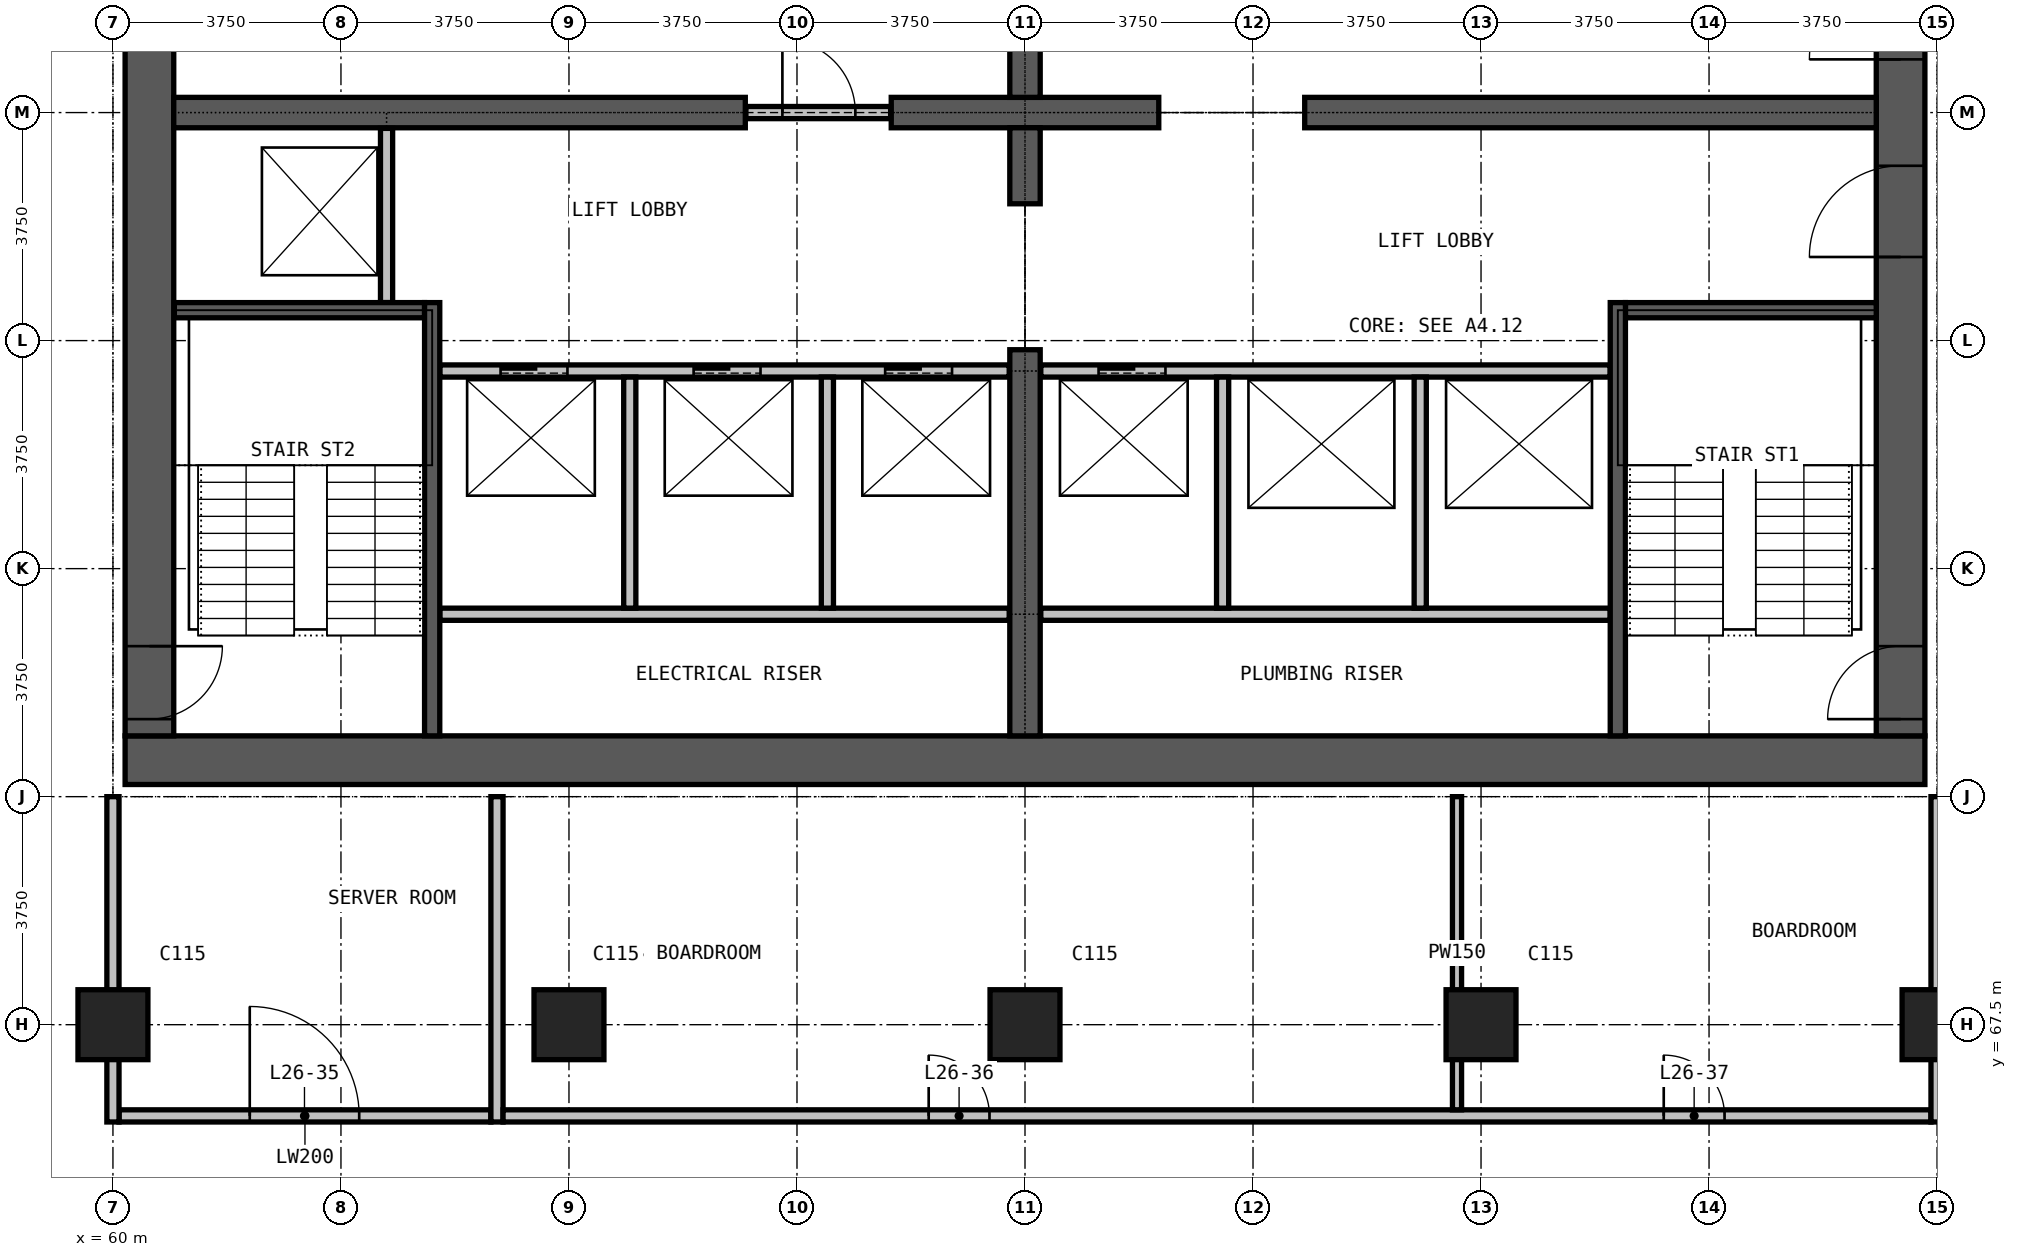
"""IFC4 building model, lengths in metres.
Left out: names, types, materials, properties, quantities, classifications, styles, units other than length and angle.
Written with IfcOpenShell. Run it as: python <this file> out.ifc"""

import sys

from ifc_helpers import new_model, si_unit, direction, frame, frame_2d, origin, origin_2d, place, context, subcontext, project, spatial, rectangle, extrude, element, fill, save


model = new_model("IFC4")
c1 = context("Model", 3, precision=1e-05, world=origin(), true_north=direction((0.0, 1.0)))
c2 = subcontext(c1, "Body", "Model", "MODEL_VIEW")
j1 = project(units=[si_unit("LENGTHUNIT", "METRE"), si_unit("PLANEANGLEUNIT", "RADIAN")], contexts=[c1])
p1 = place(None, origin())
s1 = spatial("IfcSite", under=j1, at=p1, CompositionType="ELEMENT")
p2 = place(p1, origin())
s2 = spatial("IfcBuilding", under=s1, at=p2, CompositionType="ELEMENT")
p3 = place(p2, frame((0.0, 0.0, 107.2)))
s3 = spatial("IfcBuildingStorey", under=s2, at=p3, CompositionType="ELEMENT", Elevation=107.2)
for number, where, z_axis, x_axis in (
    (1, (60.0, 67.5, 0.0), (0.0, 0.0, 1.0), (1.0, 0.0, 0.0)),
    (2, (67.5, 67.5, 0.0), (0.0, 0.0, 1.0), (1.0, 0.0, 0.0)),
    (3, (75.0, 67.5, 0.0), (0.0, 0.0, 1.0), (1.0, 0.0, 0.0)),
    (4, (82.5, 67.5, 0.0), (0.0, 0.0, 1.0), (1.0, 0.0, 0.0)),
    (5, (90.0, 67.5, 0.0), (0.0, 0.0, 1.0), (1.0, 0.0, 0.0)),
):
    element("IfcColumn", number, at=place(p3, frame(where, z_axis=z_axis, x_axis=x_axis)), inside=s3, PredefinedType="COLUMN", context=c2, shape_type="SweptSolid", body=[
        extrude(rectangle(XDim=1.15, YDim=1.15, at=origin_2d()), origin(), (0.0, 0.0, 1.0), 3.6),
    ])
p4 = place(p3, frame((60.2, 71.85, 0.0), z_axis=(0.0, 0.0, 1.0), x_axis=(1.0, 0.0, 0.0)))
e6 = element("IfcWall", 6, at=p4, inside=s3, PredefinedType="SHEAR", context=c2, shape_type="SweptSolid", body=[
    extrude(rectangle(XDim=29.6, YDim=0.8, at=frame_2d((14.8, 0.0))), origin(), (0.0, 0.0, 1.0), 3.6),
])
p5 = place(p3, frame((89.4, 72.25, 0.0), z_axis=(0.0, 0.0, 1.0), x_axis=(0.0, 1.0, 0.0)))
e7 = element("IfcWall", 7, at=p5, inside=s3, PredefinedType="SHEAR", context=c2, shape_type="SweptSolid", body=[
    extrude(rectangle(XDim=20.5, YDim=0.8, at=frame_2d((10.25, 0.0))), origin(), (0.0, 0.0, 1.0), 3.6),
])
p6 = place(p5, frame((0.275, 0.0, 0.0)))
e8 = element("IfcOpeningElement", 8, at=p6, cuts=e7, PredefinedType="OPENING", context=c2, shape_type="SweptSolid", body=[
    extrude(rectangle(XDim=1.2, YDim=2.2, at=frame_2d((0.6, 1.1))), frame((0.0, 0.41, 0.0), z_axis=(0.0, -1.0, 0.0), x_axis=(1.0, 0.0, 0.0)), (0.0, 0.0, 1.0), 0.82),
])
p7 = place(p5, frame((13.775, 0.0, 0.0)))
e9 = element("IfcOpeningElement", 9, at=p7, cuts=e7, PredefinedType="OPENING", context=c2, shape_type="SweptSolid", body=[
    extrude(rectangle(XDim=1.2, YDim=2.2, at=frame_2d((0.6, 1.1))), frame((0.0, 0.41, 0.0), z_axis=(0.0, -1.0, 0.0), x_axis=(1.0, 0.0, 0.0)), (0.0, 0.0, 1.0), 0.82),
])
p8 = place(p5, frame((7.875, 0.0, 0.0)))
e10 = element("IfcOpeningElement", 10, at=p8, cuts=e7, PredefinedType="OPENING", context=c2, shape_type="SweptSolid", body=[
    extrude(rectangle(XDim=1.5, YDim=2.2, at=frame_2d((0.75, 1.1))), frame((0.0, 0.41, 0.0), z_axis=(0.0, -1.0, 0.0), x_axis=(1.0, 0.0, 0.0)), (0.0, 0.0, 1.0), 0.82),
])
p9 = place(p5, frame((11.125, 0.0, 0.0)))
e11 = element("IfcOpeningElement", 11, at=p9, cuts=e7, PredefinedType="OPENING", context=c2, shape_type="SweptSolid", body=[
    extrude(rectangle(XDim=1.5, YDim=2.2, at=frame_2d((0.75, 1.1))), frame((0.0, 0.41, 0.0), z_axis=(0.0, -1.0, 0.0), x_axis=(1.0, 0.0, 0.0)), (0.0, 0.0, 1.0), 0.82),
])
p10 = place(p3, frame((60.6, 92.75, 0.0), z_axis=(0.0, 0.0, 1.0), x_axis=(0.0, -1.0, 0.0)))
e12 = element("IfcWall", 12, at=p10, inside=s3, PredefinedType="SHEAR", context=c2, shape_type="SweptSolid", body=[
    extrude(rectangle(XDim=20.5, YDim=0.8, at=frame_2d((10.25, 0.0))), origin(), (0.0, 0.0, 1.0), 3.6),
])
p11 = place(p10, frame((19.025, 0.0, 0.0)))
e13 = element("IfcOpeningElement", 13, at=p11, cuts=e12, PredefinedType="OPENING", context=c2, shape_type="SweptSolid", body=[
    extrude(rectangle(XDim=1.2, YDim=2.2, at=frame_2d((0.6, 1.1))), frame((0.0, 0.41, 0.0), z_axis=(0.0, -1.0, 0.0), x_axis=(1.0, 0.0, 0.0)), (0.0, 0.0, 1.0), 0.82),
])
p12 = place(p10, frame((8.025, 0.0, 0.0)))
e14 = element("IfcOpeningElement", 14, at=p12, cuts=e12, PredefinedType="OPENING", context=c2, shape_type="SweptSolid", body=[
    extrude(rectangle(XDim=1.2, YDim=2.2, at=frame_2d((0.6, 1.1))), frame((0.0, 0.41, 0.0), z_axis=(0.0, -1.0, 0.0), x_axis=(1.0, 0.0, 0.0)), (0.0, 0.0, 1.0), 0.82),
])
p13 = place(p3, frame((61.0, 82.5, 0.0), z_axis=(0.0, 0.0, 1.0), x_axis=(1.0, 0.0, 0.0)))
e15 = element("IfcWall", 15, at=p13, inside=s3, PredefinedType="SHEAR", context=c2, shape_type="SweptSolid", body=[
    extrude(rectangle(XDim=9.4, YDim=0.5, at=frame_2d((4.7, 0.0))), origin(), (0.0, 0.0, 1.0), 3.6),
])
p14 = place(p3, frame((72.8, 82.5, 0.0), z_axis=(0.0, 0.0, 1.0), x_axis=(1.0, 0.0, 0.0)))
e16 = element("IfcWall", 16, at=p14, inside=s3, PredefinedType="SHEAR", context=c2, shape_type="SweptSolid", body=[
    extrude(rectangle(XDim=4.4, YDim=0.5, at=frame_2d((2.2, 0.0))), origin(), (0.0, 0.0, 1.0), 3.6),
])
p15 = place(p3, frame((79.6, 82.5, 0.0), z_axis=(0.0, 0.0, 1.0), x_axis=(1.0, 0.0, 0.0)))
e17 = element("IfcWall", 17, at=p15, inside=s3, PredefinedType="SHEAR", context=c2, shape_type="SweptSolid", body=[
    extrude(rectangle(XDim=9.4, YDim=0.5, at=frame_2d((4.7, 0.0))), origin(), (0.0, 0.0, 1.0), 3.6),
])
p16 = place(p3, frame((75.0, 72.25, 0.0), z_axis=(0.0, 0.0, 1.0), x_axis=(0.0, 1.0, 0.0)))
e18 = element("IfcWall", 18, at=p16, inside=s3, PredefinedType="SHEAR", context=c2, shape_type="SweptSolid", body=[
    extrude(rectangle(XDim=6.35, YDim=0.5, at=frame_2d((3.175, 0.0))), origin(), (0.0, 0.0, 1.0), 3.6),
])
for number, where, z_axis, x_axis in (
    (19, (75.0, 81.0, 0.0), (0.0, 0.0, 1.0), (0.0, 1.0, 0.0)),
    (20, (75.0, 82.75, 0.0), (0.0, 0.0, 1.0), (0.0, 1.0, 0.0)),
):
    element("IfcWall", number, at=place(p3, frame(where, z_axis=z_axis, x_axis=x_axis)), inside=s3, PredefinedType="SHEAR", context=c2, shape_type="SweptSolid", body=[
        extrude(rectangle(XDim=1.25, YDim=0.5, at=frame_2d((0.625, 0.0))), origin(), (0.0, 0.0, 1.0), 3.6),
    ])
p17 = place(p3, frame((60.1, 66.0, 0.0), z_axis=(0.0, 0.0, 1.0), x_axis=(1.0, 0.0, 0.0)))
e21 = element("IfcWall", 21, at=p17, inside=s3, PredefinedType="PARTITIONING", context=c2, shape_type="SweptSolid", body=[
    extrude(rectangle(XDim=6.116, YDim=0.2, at=frame_2d((3.058, 0.0))), origin(), (0.0, 0.0, 1.0), 3.3),
])
p18 = place(p17, frame((2.15, 0.0, 0.0)))
e22 = element("IfcOpeningElement", 22, at=p18, cuts=e21, PredefinedType="OPENING", context=c2, shape_type="SweptSolid", body=[
    extrude(rectangle(XDim=1.8, YDim=2.4, at=frame_2d((0.9, 1.2))), frame((0.0, 0.11, 0.0), z_axis=(0.0, -1.0, 0.0), x_axis=(1.0, 0.0, 0.0)), (0.0, 0.0, 1.0), 0.22),
])
p19 = place(p3, frame((70.41, 82.5, 0.0), z_axis=(0.0, 0.0, 1.0), x_axis=(1.0, 0.0, 0.0)))
e23 = element("IfcWall", 23, at=p19, inside=s3, PredefinedType="PARTITIONING", context=c2, shape_type="SweptSolid", body=[
    extrude(rectangle(XDim=2.38, YDim=0.2, at=frame_2d((1.19, 0.0))), origin(), (0.0, 0.0, 1.0), 2.4),
])
p20 = place(p19, frame((0.6, 0.0, 0.0)))
e24 = element("IfcOpeningElement", 24, at=p20, cuts=e23, PredefinedType="OPENING", context=c2, shape_type="SweptSolid", body=[
    extrude(rectangle(XDim=1.2, YDim=2.2, at=frame_2d((0.6, 1.1))), frame((0.0, 0.11, 0.0), z_axis=(0.0, -1.0, 0.0), x_axis=(1.0, 0.0, 0.0)), (0.0, 0.0, 1.0), 0.22),
])
for number, where, z_axis, x_axis in (
    (25, (60.0, 65.9, 0.0), (0.0, 0.0, 1.0), (0.0, 1.0, 0.0)),
    (26, (66.316, 65.9, 0.0), (0.0, 0.0, 1.0), (0.0, 1.0, 0.0)),
):
    element("IfcWall", number, at=place(p3, frame(where, z_axis=z_axis, x_axis=x_axis)), inside=s3, PredefinedType="PARTITIONING", context=c2, shape_type="SweptSolid", body=[
        extrude(rectangle(XDim=5.35, YDim=0.2, at=frame_2d((2.675, 0.0))), origin(), (0.0, 0.0, 1.0), 3.3),
    ])
p21 = place(p3, frame((66.416, 66.0, 0.0), z_axis=(0.0, 0.0, 1.0), x_axis=(1.0, 0.0, 0.0)))
e27 = element("IfcWall", 27, at=p21, inside=s3, PredefinedType="PARTITIONING", context=c2, shape_type="SweptSolid", body=[
    extrude(rectangle(XDim=23.484, YDim=0.2, at=frame_2d((11.742, 0.0))), origin(), (0.0, 0.0, 1.0), 3.3),
])
p22 = place(p21, frame((7.0, 0.0, 0.0)))
e28 = element("IfcOpeningElement", 28, at=p22, cuts=e27, PredefinedType="OPENING", context=c2, shape_type="SweptSolid", body=[
    extrude(rectangle(XDim=1.0, YDim=2.2, at=frame_2d((0.5, 1.1))), frame((0.0, 0.11, 0.0), z_axis=(0.0, -1.0, 0.0), x_axis=(1.0, 0.0, 0.0)), (0.0, 0.0, 1.0), 0.22),
])
p23 = place(p21, frame((19.089, 0.0, 0.0)))
e29 = element("IfcOpeningElement", 29, at=p23, cuts=e27, PredefinedType="OPENING", context=c2, shape_type="SweptSolid", body=[
    extrude(rectangle(XDim=1.0, YDim=2.2, at=frame_2d((0.5, 1.1))), frame((0.0, 0.11, 0.0), z_axis=(0.0, -1.0, 0.0), x_axis=(1.0, 0.0, 0.0)), (0.0, 0.0, 1.0), 0.22),
])
p24 = place(p3, frame((90.0, 65.9, 0.0), z_axis=(0.0, 0.0, 1.0), x_axis=(0.0, 1.0, 0.0)))
e30 = element("IfcWall", 30, at=p24, inside=s3, PredefinedType="PARTITIONING", context=c2, shape_type="SweptSolid", body=[
    extrude(rectangle(XDim=5.35, YDim=0.2, at=frame_2d((2.675, 0.0))), origin(), (0.0, 0.0, 1.0), 3.3),
])
p25 = place(p3, frame((82.105, 66.1, 0.0), z_axis=(0.0, 0.0, 1.0), x_axis=(0.0, 1.0, 0.0)))
e31 = element("IfcWall", 31, at=p25, inside=s3, PredefinedType="PARTITIONING", context=c2, shape_type="SweptSolid", body=[
    extrude(rectangle(XDim=5.15, YDim=0.15, at=frame_2d((2.575, 0.0))), origin(), (0.0, 0.0, 1.0), 3.3),
])
for number, where, z_axis, x_axis in (
    (32, (65.375, 74.25, 0.0), (0.0, 0.0, 1.0), (1.0, 0.0, 0.0)),
    (33, (75.26, 74.25, 0.0), (0.0, 0.0, 1.0), (1.0, 0.0, 0.0)),
):
    element("IfcWall", number, at=place(p3, frame(where, z_axis=z_axis, x_axis=x_axis)), inside=s3, PredefinedType="PARTITIONING", context=c2, shape_type="SweptSolid", body=[
        extrude(rectangle(XDim=9.365, YDim=0.2, at=frame_2d((4.683, 0.0))), origin(), (0.0, 0.0, 1.0), 3.3),
    ])
p26 = place(p3, frame((65.375, 78.25, 0.0), z_axis=(0.0, 0.0, 1.0), x_axis=(1.0, 0.0, 0.0)))
e34 = element("IfcWall", 34, at=p26, inside=s3, PredefinedType="PARTITIONING", context=c2, shape_type="SweptSolid", body=[
    extrude(rectangle(XDim=9.365, YDim=0.2, at=frame_2d((4.683, 0.0))), origin(), (0.0, 0.0, 1.0), 3.3),
])
p27 = place(p26, frame((1.0, 0.0, 0.0)))
e35 = element("IfcOpeningElement", 35, at=p27, cuts=e34, PredefinedType="OPENING", context=c2, shape_type="SweptSolid", body=[
    extrude(rectangle(XDim=1.1, YDim=2.2, at=frame_2d((0.55, 1.1))), frame((0.0, 0.11, 0.0), z_axis=(0.0, -1.0, 0.0), x_axis=(1.0, 0.0, 0.0)), (0.0, 0.0, 1.0), 0.22),
])
p28 = place(p26, frame((4.175, 0.0, 0.0)))
e36 = element("IfcOpeningElement", 36, at=p28, cuts=e34, PredefinedType="OPENING", context=c2, shape_type="SweptSolid", body=[
    extrude(rectangle(XDim=1.1, YDim=2.2, at=frame_2d((0.55, 1.1))), frame((0.0, 0.11, 0.0), z_axis=(0.0, -1.0, 0.0), x_axis=(1.0, 0.0, 0.0)), (0.0, 0.0, 1.0), 0.22),
])
p29 = place(p26, frame((7.325, 0.0, 0.0)))
e37 = element("IfcOpeningElement", 37, at=p29, cuts=e34, PredefinedType="OPENING", context=c2, shape_type="SweptSolid", body=[
    extrude(rectangle(XDim=1.1, YDim=2.2, at=frame_2d((0.55, 1.1))), frame((0.0, 0.11, 0.0), z_axis=(0.0, -1.0, 0.0), x_axis=(1.0, 0.0, 0.0)), (0.0, 0.0, 1.0), 0.22),
])
p30 = place(p3, frame((75.26, 78.25, 0.0), z_axis=(0.0, 0.0, 1.0), x_axis=(1.0, 0.0, 0.0)))
e38 = element("IfcWall", 38, at=p30, inside=s3, PredefinedType="PARTITIONING", context=c2, shape_type="SweptSolid", body=[
    extrude(rectangle(XDim=9.365, YDim=0.2, at=frame_2d((4.683, 0.0))), origin(), (0.0, 0.0, 1.0), 3.3),
])
p31 = place(p30, frame((0.95, 0.0, 0.0)))
e39 = element("IfcOpeningElement", 39, at=p31, cuts=e38, PredefinedType="OPENING", context=c2, shape_type="SweptSolid", body=[
    extrude(rectangle(XDim=1.1, YDim=2.2, at=frame_2d((0.55, 1.1))), frame((0.0, 0.11, 0.0), z_axis=(0.0, -1.0, 0.0), x_axis=(1.0, 0.0, 0.0)), (0.0, 0.0, 1.0), 0.22),
])
p32 = place(p3, frame((64.5, 79.375, 0.0), z_axis=(0.0, 0.0, 1.0), x_axis=(0.0, 1.0, 0.0)))
e40 = element("IfcWall", 40, at=p32, inside=s3, PredefinedType="PARTITIONING", context=c2, shape_type="SweptSolid", body=[
    extrude(rectangle(XDim=2.865, YDim=0.2, at=frame_2d((1.433, 0.0))), origin(), (0.0, 0.0, 1.0), 3.3),
])
for number, where, z_axis, x_axis in (
    (41, (68.5, 74.35, 0.0), (0.0, 0.0, 1.0), (0.0, 1.0, 0.0)),
    (42, (71.75, 74.35, 0.0), (0.0, 0.0, 1.0), (0.0, 1.0, 0.0)),
    (43, (78.25, 74.35, 0.0), (0.0, 0.0, 1.0), (0.0, 1.0, 0.0)),
    (44, (81.5, 74.35, 0.0), (0.0, 0.0, 1.0), (0.0, 1.0, 0.0)),
):
    element("IfcWall", number, at=place(p3, frame(where, z_axis=z_axis, x_axis=x_axis)), inside=s3, PredefinedType="PARTITIONING", context=c2, shape_type="SweptSolid", body=[
        extrude(rectangle(XDim=3.8, YDim=0.2, at=frame_2d((1.9, 0.0))), origin(), (0.0, 0.0, 1.0), 3.3),
    ])
p33 = place(p3, frame((61.01, 79.25, 0.0), z_axis=(0.0, 0.0, 1.0), x_axis=(1.0, 0.0, 0.0)))
e45 = element("IfcWall", 45, at=p33, inside=s3, PredefinedType="PARTITIONING", context=c2, shape_type="SweptSolid", body=[
    extrude(rectangle(XDim=4.115, YDim=0.25, at=frame_2d((2.058, 0.0))), origin(), (0.0, 0.0, 1.0), 3.3),
])
p34 = place(p3, frame((84.875, 79.25, 0.0), z_axis=(0.0, 0.0, 1.0), x_axis=(1.0, 0.0, 0.0)))
e46 = element("IfcWall", 46, at=p34, inside=s3, PredefinedType="PARTITIONING", context=c2, shape_type="SweptSolid", body=[
    extrude(rectangle(XDim=4.125, YDim=0.25, at=frame_2d((2.062, 0.0))), origin(), (0.0, 0.0, 1.0), 3.3),
])
for number, where, z_axis, x_axis in (
    (47, (65.25, 72.25, 0.0), (0.0, 0.0, 1.0), (0.0, 1.0, 0.0)),
    (48, (84.75, 72.25, 0.0), (0.0, 0.0, 1.0), (0.0, 1.0, 0.0)),
):
    element("IfcWall", number, at=place(p3, frame(where, z_axis=z_axis, x_axis=x_axis)), inside=s3, PredefinedType="PARTITIONING", context=c2, shape_type="SweptSolid", body=[
        extrude(rectangle(XDim=7.125, YDim=0.25, at=frame_2d((3.562, 0.0))), origin(), (0.0, 0.0, 1.0), 3.3),
    ])
p35 = place(p27, origin())
e49 = element("IfcDoor", 49, at=p35, inside=s3, OperationType="DOUBLE_DOOR_SLIDING", PredefinedType="DOOR", context=c2, shape_type="SweptSolid", body=[
    extrude(rectangle(XDim=1.1, YDim=2.2, at=frame_2d((0.55, 1.1))), frame((0.0, 0.025, 0.0), z_axis=(0.0, -1.0, 0.0), x_axis=(1.0, 0.0, 0.0)), (0.0, 0.0, 1.0), 0.05),
])
fill(e35, e49)
p36 = place(p28, origin())
e50 = element("IfcDoor", 50, at=p36, inside=s3, OperationType="DOUBLE_DOOR_SLIDING", PredefinedType="DOOR", context=c2, shape_type="SweptSolid", body=[
    extrude(rectangle(XDim=1.1, YDim=2.2, at=frame_2d((0.55, 1.1))), frame((0.0, 0.025, 0.0), z_axis=(0.0, -1.0, 0.0), x_axis=(1.0, 0.0, 0.0)), (0.0, 0.0, 1.0), 0.05),
])
fill(e36, e50)
p37 = place(p29, origin())
e51 = element("IfcDoor", 51, at=p37, inside=s3, OperationType="DOUBLE_DOOR_SLIDING", PredefinedType="DOOR", context=c2, shape_type="SweptSolid", body=[
    extrude(rectangle(XDim=1.1, YDim=2.2, at=frame_2d((0.55, 1.1))), frame((0.0, 0.025, 0.0), z_axis=(0.0, -1.0, 0.0), x_axis=(1.0, 0.0, 0.0)), (0.0, 0.0, 1.0), 0.05),
])
fill(e37, e51)
p38 = place(p31, origin())
e52 = element("IfcDoor", 52, at=p38, inside=s3, OperationType="DOUBLE_DOOR_SLIDING", PredefinedType="DOOR", context=c2, shape_type="SweptSolid", body=[
    extrude(rectangle(XDim=1.1, YDim=2.2, at=frame_2d((0.55, 1.1))), frame((0.0, 0.025, 0.0), z_axis=(0.0, -1.0, 0.0), x_axis=(1.0, 0.0, 0.0)), (0.0, 0.0, 1.0), 0.05),
])
fill(e39, e52)
p39 = place(p20, origin())
e53 = element("IfcDoor", 53, at=p39, inside=s3, OperationType="SINGLE_SWING_LEFT", PredefinedType="DOOR", context=c2, shape_type="SweptSolid", body=[
    extrude(rectangle(XDim=1.2, YDim=2.2, at=frame_2d((0.6, 1.1))), frame((0.0, 0.025, 0.0), z_axis=(0.0, -1.0, 0.0), x_axis=(1.0, 0.0, 0.0)), (0.0, 0.0, 1.0), 0.05),
])
fill(e24, e53)
p40 = place(p6, origin())
e54 = element("IfcDoor", 54, at=p40, inside=s3, OperationType="SINGLE_SWING_LEFT", PredefinedType="DOOR", context=c2, shape_type="SweptSolid", body=[
    extrude(rectangle(XDim=1.2, YDim=2.2, at=frame_2d((0.6, 1.1))), frame((0.0, 0.025, 0.0), z_axis=(0.0, -1.0, 0.0), x_axis=(1.0, 0.0, 0.0)), (0.0, 0.0, 1.0), 0.05),
])
fill(e8, e54)
p41 = place(p11, origin())
e55 = element("IfcDoor", 55, at=p41, inside=s3, OperationType="SINGLE_SWING_LEFT", PredefinedType="DOOR", context=c2, shape_type="SweptSolid", body=[
    extrude(rectangle(XDim=1.2, YDim=2.2, at=frame_2d((0.6, 1.1))), frame((0.0, 0.025, 0.0), z_axis=(0.0, -1.0, 0.0), x_axis=(1.0, 0.0, 0.0)), (0.0, 0.0, 1.0), 0.05),
])
fill(e13, e55)
p42 = place(p8, origin())
e56 = element("IfcDoor", 56, at=p42, inside=s3, OperationType="DOUBLE_DOOR_SINGLE_SWING", PredefinedType="DOOR", context=c2, shape_type="SweptSolid", body=[
    extrude(rectangle(XDim=1.5, YDim=2.2, at=frame_2d((0.75, 1.1))), frame((0.0, 0.025, 0.0), z_axis=(0.0, -1.0, 0.0), x_axis=(1.0, 0.0, 0.0)), (0.0, 0.0, 1.0), 0.05),
])
fill(e10, e56)
p43 = place(p9, origin())
e57 = element("IfcDoor", 57, at=p43, inside=s3, OperationType="DOUBLE_DOOR_SINGLE_SWING", PredefinedType="DOOR", context=c2, shape_type="SweptSolid", body=[
    extrude(rectangle(XDim=1.5, YDim=2.2, at=frame_2d((0.75, 1.1))), frame((0.0, 0.025, 0.0), z_axis=(0.0, -1.0, 0.0), x_axis=(1.0, 0.0, 0.0)), (0.0, 0.0, 1.0), 0.05),
])
fill(e11, e57)
p44 = place(p18, origin())
e58 = element("IfcDoor", 58, at=p44, inside=s3, OperationType="DOUBLE_DOOR_SINGLE_SWING", PredefinedType="DOOR", context=c2, shape_type="SweptSolid", body=[
    extrude(rectangle(XDim=1.8, YDim=2.4, at=frame_2d((0.9, 1.2))), frame((0.0, 0.025, 0.0), z_axis=(0.0, -1.0, 0.0), x_axis=(1.0, 0.0, 0.0)), (0.0, 0.0, 1.0), 0.05),
])
fill(e22, e58)
p45 = place(p22, origin())
e59 = element("IfcDoor", 59, at=p45, inside=s3, OperationType="SINGLE_SWING_LEFT", PredefinedType="DOOR", context=c2, shape_type="SweptSolid", body=[
    extrude(rectangle(XDim=1.0, YDim=2.2, at=frame_2d((0.5, 1.1))), frame((0.0, 0.025, 0.0), z_axis=(0.0, -1.0, 0.0), x_axis=(1.0, 0.0, 0.0)), (0.0, 0.0, 1.0), 0.05),
])
fill(e28, e59)
p46 = place(p23, origin())
e60 = element("IfcDoor", 60, at=p46, inside=s3, OperationType="SINGLE_SWING_LEFT", PredefinedType="DOOR", context=c2, shape_type="SweptSolid", body=[
    extrude(rectangle(XDim=1.0, YDim=2.2, at=frame_2d((0.5, 1.1))), frame((0.0, 0.025, 0.0), z_axis=(0.0, -1.0, 0.0), x_axis=(1.0, 0.0, 0.0)), (0.0, 0.0, 1.0), 0.05),
])
fill(e29, e60)
save(model, sys.argv[1])
